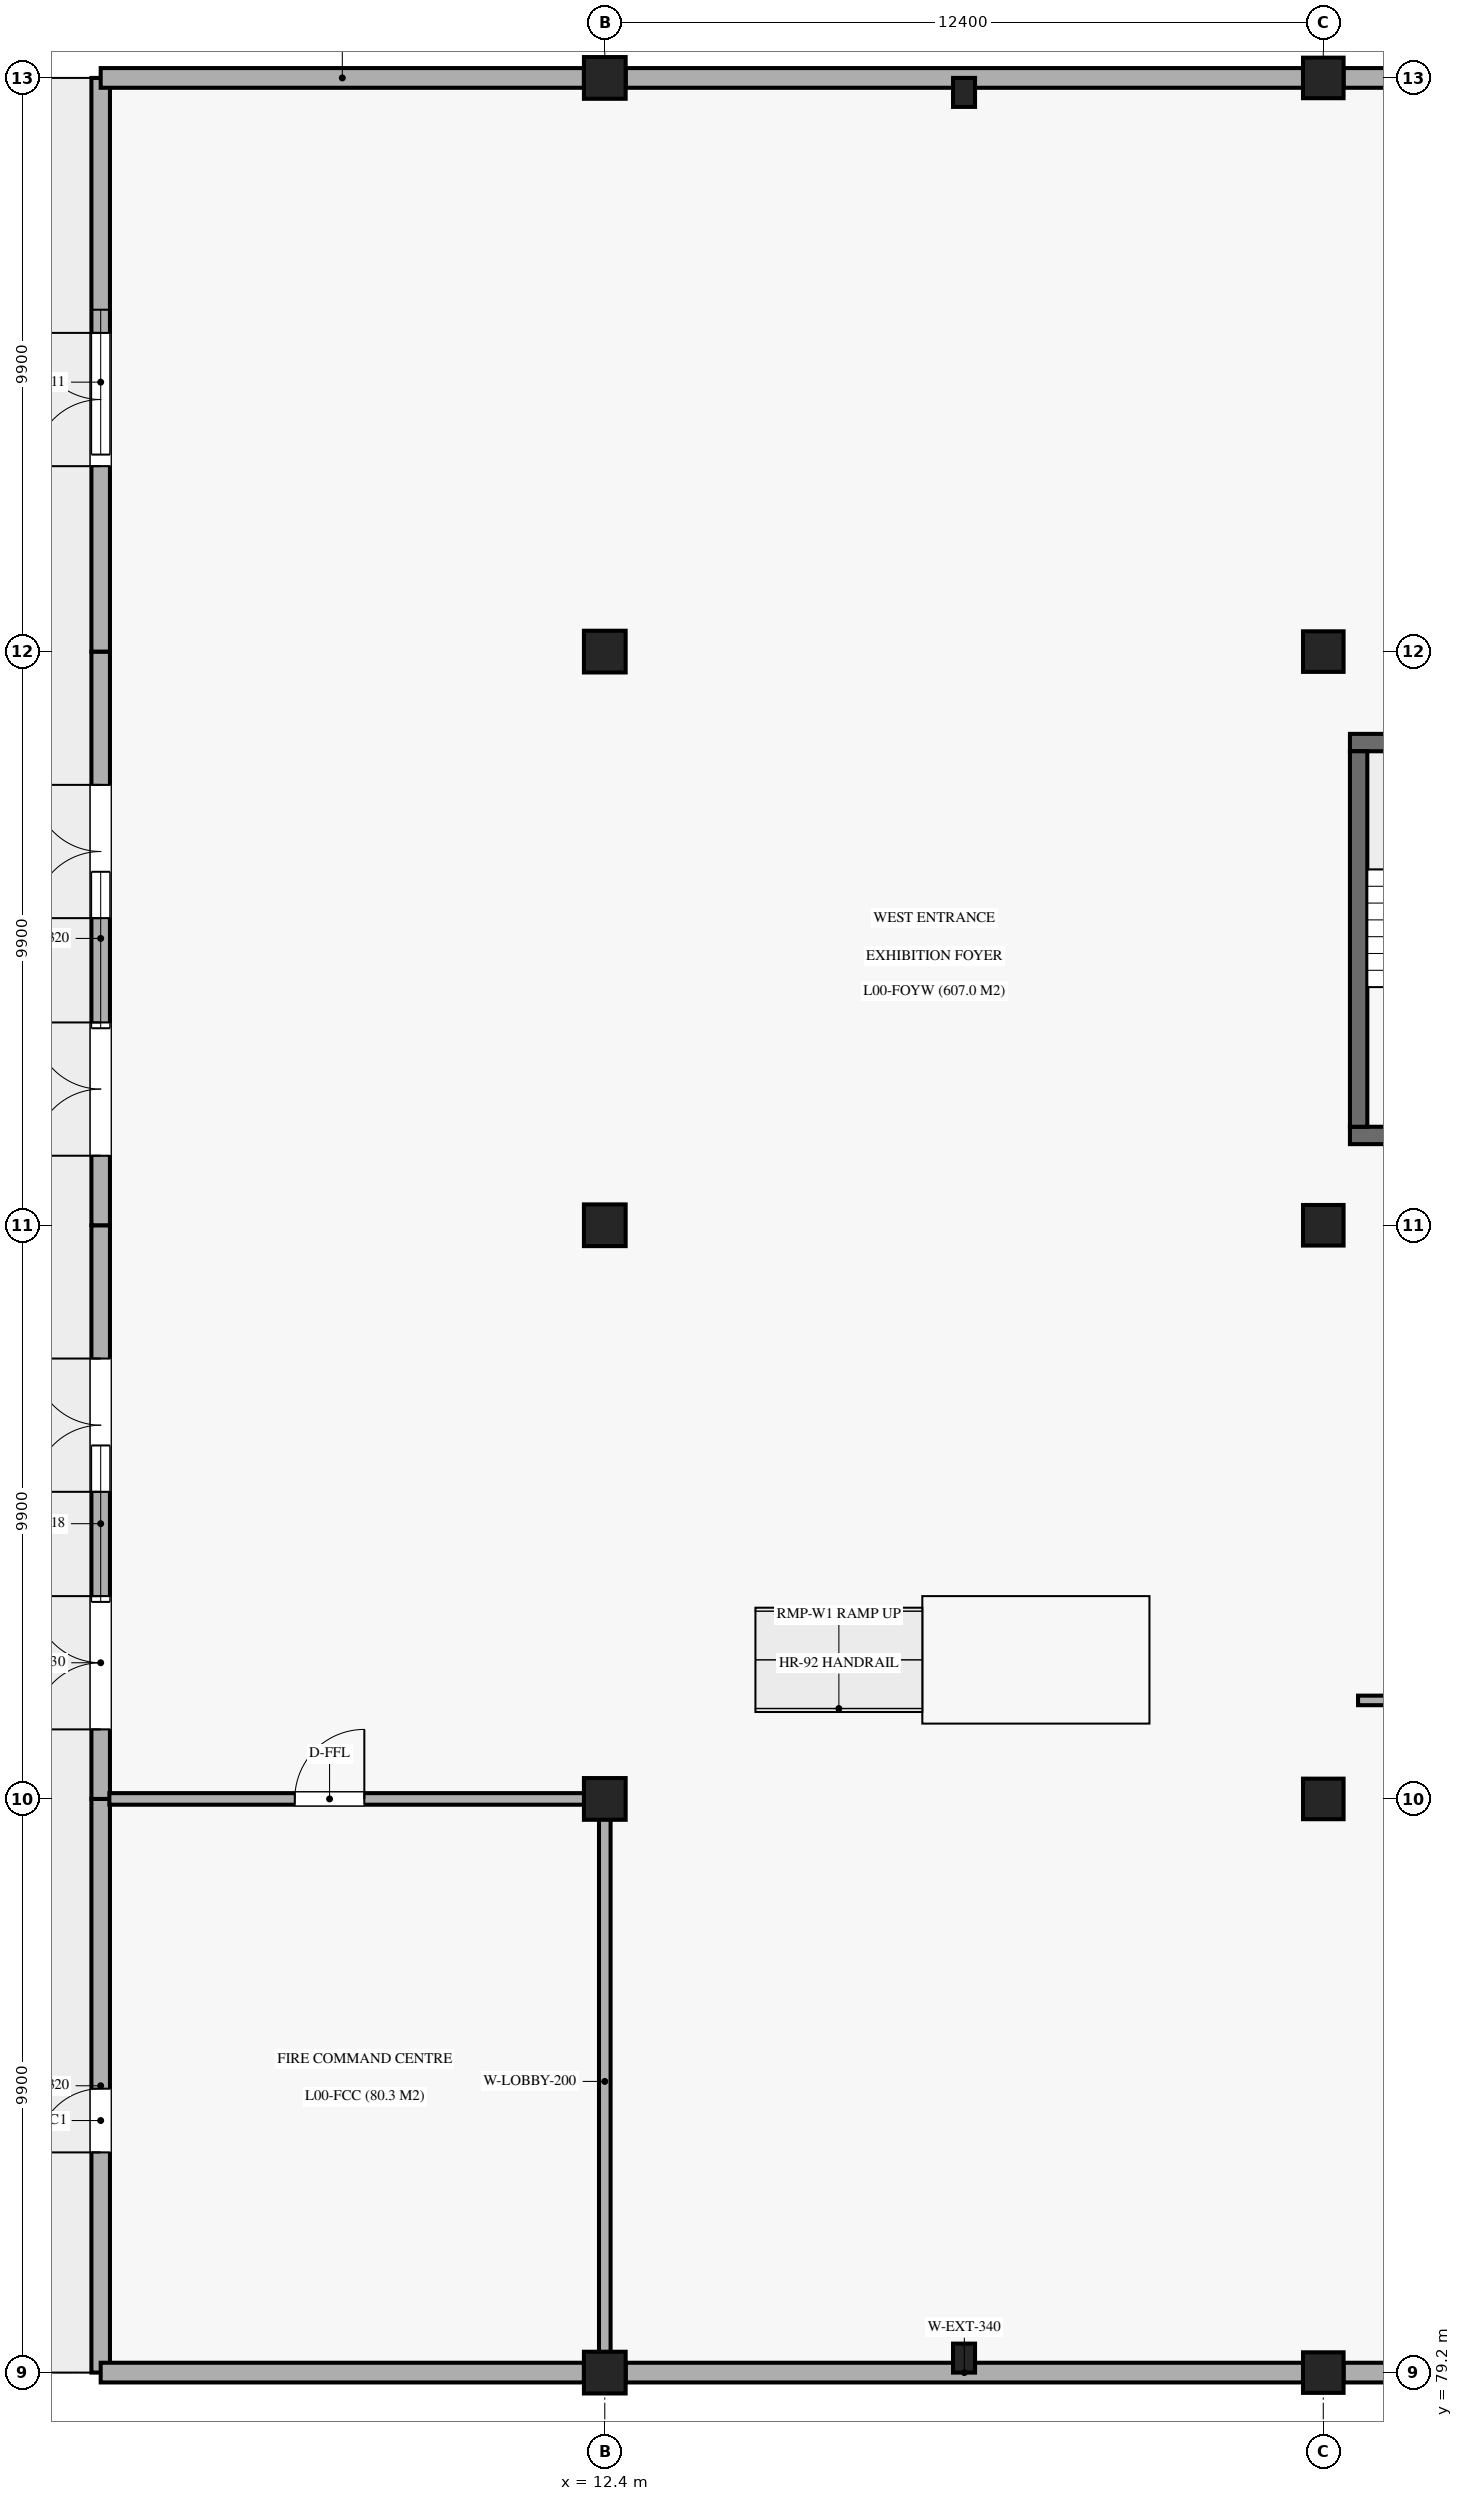
"""IFC4 building model, lengths in metres.
Left out: names, types, materials, properties, quantities, classifications, styles, units other than length and angle.
Written with IfcOpenShell. Run it as: python <this file> out.ifc"""

import sys

from ifc_helpers import new_model, si_unit, direction, frame, frame_2d, origin, origin_2d, place, context, subcontext, project, spatial, rectangle, circle, extrude, element, fill, save


model = new_model("IFC4")
c1 = context("Model", 3, precision=1e-05, world=origin(), true_north=direction((0.0, 1.0)))
c2 = subcontext(c1, "Body", "Model", "MODEL_VIEW")
j1 = project(units=[si_unit("LENGTHUNIT", "METRE"), si_unit("PLANEANGLEUNIT", "RADIAN")], contexts=[c1])
p1 = place(None, origin())
s1 = spatial("IfcSite", under=j1, at=p1, CompositionType="ELEMENT")
p2 = place(p1, origin())
s2 = spatial("IfcBuilding", under=s1, at=p2, CompositionType="ELEMENT")
p3 = place(p2, origin())
s3 = spatial("IfcBuildingStorey", under=s2, at=p3, CompositionType="ELEMENT", Elevation=0.0)
for number, where, z_axis, x_axis in (
    (1, (12.4, 79.2, 0.0), (0.0, 0.0, 1.0), (1.0, 0.0, 0.0)),
    (2, (12.4, 89.1, 0.0), (0.0, 0.0, 1.0), (1.0, 0.0, 0.0)),
    (3, (12.4, 99.0, 0.0), (0.0, 0.0, 1.0), (1.0, 0.0, 0.0)),
    (4, (12.4, 108.9, 0.0), (0.0, 0.0, 1.0), (1.0, 0.0, 0.0)),
    (5, (12.4, 118.8, 0.0), (0.0, 0.0, 1.0), (1.0, 0.0, 0.0)),
):
    element("IfcColumn", number, at=place(p3, frame(where, z_axis=z_axis, x_axis=x_axis)), inside=s3, PredefinedType="COLUMN", context=c2, shape_type="SweptSolid", body=[
        extrude(circle(Radius=0.36, at=origin_2d()), origin(), (0.0, 0.0, 1.0), 5.44),
    ])
for number, where, z_axis, x_axis in (
    (6, (24.8, 79.2, 0.0), (0.0, 0.0, 1.0), (1.0, 0.0, 0.0)),
    (7, (24.8, 89.1, 0.0), (0.0, 0.0, 1.0), (1.0, 0.0, 0.0)),
    (8, (24.8, 99.0, 0.0), (0.0, 0.0, 1.0), (1.0, 0.0, 0.0)),
    (9, (24.8, 108.9, 0.0), (0.0, 0.0, 1.0), (1.0, 0.0, 0.0)),
    (10, (24.8, 118.8, 0.0), (0.0, 0.0, 1.0), (1.0, 0.0, 0.0)),
):
    element("IfcColumn", number, at=place(p3, frame(where, z_axis=z_axis, x_axis=x_axis)), inside=s3, PredefinedType="COLUMN", context=c2, shape_type="SweptSolid", body=[
        extrude(rectangle(XDim=0.7, YDim=0.7, at=origin_2d()), origin(), (0.0, 0.0, 1.0), 5.44),
    ])
for number, where, z_axis, x_axis in (
    (11, (18.6, 79.45, 0.0), (0.0, 0.0, 1.0), (1.0, 0.0, 0.0)),
    (12, (18.6, 118.55, 0.0), (0.0, 0.0, 1.0), (1.0, 0.0, 0.0)),
):
    element("IfcColumn", number, at=place(p3, frame(where, z_axis=z_axis, x_axis=x_axis)), inside=s3, PredefinedType="PILASTER", context=c2, shape_type="SweptSolid", body=[
        extrude(rectangle(XDim=0.38, YDim=0.5, at=origin_2d()), origin(), (0.0, 0.0, 1.0), 5.44),
    ])
p4 = place(p3, frame((3.7, 79.2, 0.0), z_axis=(0.0, 0.0, 1.0), x_axis=(0.0, 1.0, 0.0)))
e13 = element("IfcWall", 13, at=p4, inside=s3, PredefinedType="SOLIDWALL", context=c2, shape_type="SweptSolid", body=[
    extrude(rectangle(XDim=9.9, YDim=0.32, at=frame_2d((4.95, 0.0))), origin(), (0.0, 0.0, 1.0), 4.4),
])
p5 = place(p4, frame((3.8, 0.0, 0.0)))
e14 = element("IfcOpeningElement", 14, at=p5, cuts=e13, PredefinedType="OPENING", context=c2, shape_type="SweptSolid", body=[
    extrude(rectangle(XDim=1.1, YDim=2.2, at=frame_2d((0.55, 1.1))), frame((0.0, 0.17, 0.0), z_axis=(0.0, -1.0, 0.0), x_axis=(1.0, 0.0, 0.0)), (0.0, 0.0, 1.0), 0.34),
])
p6 = place(p3, frame((3.7, 89.1, 0.0), z_axis=(0.0, 0.0, 1.0), x_axis=(0.0, 1.0, 0.0)))
e15 = element("IfcWall", 15, at=p6, inside=s3, PredefinedType="SOLIDWALL", context=c2, shape_type="SweptSolid", body=[
    extrude(rectangle(XDim=9.9, YDim=0.32, at=frame_2d((4.95, 0.0))), origin(), (0.0, 0.0, 1.0), 4.4),
])
p7 = place(p6, frame((3.4, 0.0, 2.65)))
e16 = element("IfcOpeningElement", 16, at=p7, cuts=e15, PredefinedType="OPENING", context=c2, shape_type="SweptSolid", body=[
    extrude(rectangle(XDim=2.7, YDim=1.5, at=frame_2d((1.35, 0.75))), frame((0.0, 0.17, 0.0), z_axis=(0.0, -1.0, 0.0), x_axis=(1.0, 0.0, 0.0)), (0.0, 0.0, 1.0), 0.34),
])
p8 = place(p6, frame((1.2, 0.0, 0.0)))
e17 = element("IfcOpeningElement", 17, at=p8, cuts=e15, PredefinedType="OPENING", context=c2, shape_type="SweptSolid", body=[
    extrude(rectangle(XDim=2.3, YDim=2.4, at=frame_2d((1.15, 1.2))), frame((0.0, 0.17, 0.0), z_axis=(0.0, -1.0, 0.0), x_axis=(1.0, 0.0, 0.0)), (0.0, 0.0, 1.0), 0.34),
])
p9 = place(p6, frame((5.3, 0.0, 0.0)))
e18 = element("IfcOpeningElement", 18, at=p9, cuts=e15, PredefinedType="OPENING", context=c2, shape_type="SweptSolid", body=[
    extrude(rectangle(XDim=2.3, YDim=2.4, at=frame_2d((1.15, 1.2))), frame((0.0, 0.17, 0.0), z_axis=(0.0, -1.0, 0.0), x_axis=(1.0, 0.0, 0.0)), (0.0, 0.0, 1.0), 0.34),
])
p10 = place(p3, frame((3.7, 99.0, 0.0), z_axis=(0.0, 0.0, 1.0), x_axis=(0.0, 1.0, 0.0)))
e19 = element("IfcWall", 19, at=p10, inside=s3, PredefinedType="SOLIDWALL", context=c2, shape_type="SweptSolid", body=[
    extrude(rectangle(XDim=9.9, YDim=0.32, at=frame_2d((4.95, 0.0))), origin(), (0.0, 0.0, 1.0), 4.4),
])
p11 = place(p10, frame((3.4, 0.0, 2.65)))
e20 = element("IfcOpeningElement", 20, at=p11, cuts=e19, PredefinedType="OPENING", context=c2, shape_type="SweptSolid", body=[
    extrude(rectangle(XDim=2.7, YDim=1.5, at=frame_2d((1.35, 0.75))), frame((0.0, 0.17, 0.0), z_axis=(0.0, -1.0, 0.0), x_axis=(1.0, 0.0, 0.0)), (0.0, 0.0, 1.0), 0.34),
])
p12 = place(p10, frame((1.2, 0.0, 0.0)))
e21 = element("IfcOpeningElement", 21, at=p12, cuts=e19, PredefinedType="OPENING", context=c2, shape_type="SweptSolid", body=[
    extrude(rectangle(XDim=2.3, YDim=2.4, at=frame_2d((1.15, 1.2))), frame((0.0, 0.17, 0.0), z_axis=(0.0, -1.0, 0.0), x_axis=(1.0, 0.0, 0.0)), (0.0, 0.0, 1.0), 0.34),
])
p13 = place(p10, frame((5.3, 0.0, 0.0)))
e22 = element("IfcOpeningElement", 22, at=p13, cuts=e19, PredefinedType="OPENING", context=c2, shape_type="SweptSolid", body=[
    extrude(rectangle(XDim=2.3, YDim=2.4, at=frame_2d((1.15, 1.2))), frame((0.0, 0.17, 0.0), z_axis=(0.0, -1.0, 0.0), x_axis=(1.0, 0.0, 0.0)), (0.0, 0.0, 1.0), 0.34),
])
p14 = place(p3, frame((3.7, 108.9, 0.0), z_axis=(0.0, 0.0, 1.0), x_axis=(0.0, 1.0, 0.0)))
e23 = element("IfcWall", 23, at=p14, inside=s3, PredefinedType="SOLIDWALL", context=c2, shape_type="SweptSolid", body=[
    extrude(rectangle(XDim=9.9, YDim=0.32, at=frame_2d((4.95, 0.0))), origin(), (0.0, 0.0, 1.0), 4.4),
])
p15 = place(p14, frame((3.4, 0.0, 2.65)))
e24 = element("IfcOpeningElement", 24, at=p15, cuts=e23, PredefinedType="OPENING", context=c2, shape_type="SweptSolid", body=[
    extrude(rectangle(XDim=2.5, YDim=1.6, at=frame_2d((1.25, 0.8))), frame((0.0, 0.17, 0.0), z_axis=(0.0, -1.0, 0.0), x_axis=(1.0, 0.0, 0.0)), (0.0, 0.0, 1.0), 0.34),
])
p16 = place(p14, frame((3.2, 0.0, 0.0)))
e25 = element("IfcOpeningElement", 25, at=p16, cuts=e23, PredefinedType="OPENING", context=c2, shape_type="SweptSolid", body=[
    extrude(rectangle(XDim=2.3, YDim=2.4, at=frame_2d((1.15, 1.2))), frame((0.0, 0.17, 0.0), z_axis=(0.0, -1.0, 0.0), x_axis=(1.0, 0.0, 0.0)), (0.0, 0.0, 1.0), 0.34),
])
p17 = place(p3, frame((3.7, 118.8, 0.0), z_axis=(0.0, 0.0, 1.0), x_axis=(1.0, 0.0, 0.0)))
e26 = element("IfcWall", 26, at=p17, inside=s3, PredefinedType="SOLIDWALL", context=c2, shape_type="SweptSolid", body=[
    extrude(rectangle(XDim=8.34, YDim=0.34, at=frame_2d((4.17, 0.0))), origin(), (0.0, 0.0, 1.0), 4.4),
])
p18 = place(p3, frame((3.7, 79.2, 0.0), z_axis=(0.0, 0.0, 1.0), x_axis=(1.0, 0.0, 0.0)))
e27 = element("IfcWall", 27, at=p18, inside=s3, PredefinedType="SOLIDWALL", context=c2, shape_type="SweptSolid", body=[
    extrude(rectangle(XDim=8.34, YDim=0.34, at=frame_2d((4.17, 0.0))), origin(), (0.0, 0.0, 1.0), 4.33),
])
p19 = place(p3, frame((12.76, 118.8, 0.0), z_axis=(0.0, 0.0, 1.0), x_axis=(1.0, 0.0, 0.0)))
e28 = element("IfcWall", 28, at=p19, inside=s3, PredefinedType="SOLIDWALL", context=c2, shape_type="SweptSolid", body=[
    extrude(rectangle(XDim=11.69, YDim=0.34, at=frame_2d((5.845, 0.0))), origin(), (0.0, 0.0, 1.0), 4.4),
])
p20 = place(p3, frame((12.76, 79.2, 0.0), z_axis=(0.0, 0.0, 1.0), x_axis=(1.0, 0.0, 0.0)))
e29 = element("IfcWall", 29, at=p20, inside=s3, PredefinedType="SOLIDWALL", context=c2, shape_type="SweptSolid", body=[
    extrude(rectangle(XDim=11.69, YDim=0.34, at=frame_2d((5.845, 0.0))), origin(), (0.0, 0.0, 1.0), 4.33),
])
p21 = place(p3, frame((25.15, 118.8, 0.0), z_axis=(0.0, 0.0, 1.0), x_axis=(1.0, 0.0, 0.0)))
e30 = element("IfcWall", 30, at=p21, inside=s3, PredefinedType="SOLIDWALL", context=c2, shape_type="SweptSolid", body=[
    extrude(rectangle(XDim=11.7, YDim=0.34, at=frame_2d((5.85, 0.0))), origin(), (0.0, 0.0, 1.0), 4.4),
])
p22 = place(p3, frame((25.15, 79.2, 0.0), z_axis=(0.0, 0.0, 1.0), x_axis=(1.0, 0.0, 0.0)))
e31 = element("IfcWall", 31, at=p22, inside=s3, PredefinedType="SOLIDWALL", context=c2, shape_type="SweptSolid", body=[
    extrude(rectangle(XDim=11.7, YDim=0.34, at=frame_2d((5.85, 0.0))), origin(), (0.0, 0.0, 1.0), 4.33),
])
p23 = place(p3, frame((25.26, 100.55, 0.0), z_axis=(0.0, 0.0, 1.0), x_axis=(1.0, 0.0, 0.0)))
e32 = element("IfcWall", 32, at=p23, inside=s3, PredefinedType="SHEAR", context=c2, shape_type="SweptSolid", body=[
    extrude(rectangle(XDim=7.08, YDim=0.3, at=frame_2d((3.54, 0.0))), origin(), (0.0, 0.0, 1.0), 5.18),
])
p24 = place(p23, frame((0.72, 0.0, 0.0)))
e33 = element("IfcOpeningElement", 33, at=p24, cuts=e32, PredefinedType="OPENING", context=c2, shape_type="SweptSolid", body=[
    extrude(rectangle(XDim=1.2, YDim=2.2, at=frame_2d((0.6, 1.1))), frame((0.0, 0.16, 0.0), z_axis=(0.0, -1.0, 0.0), x_axis=(1.0, 0.0, 0.0)), (0.0, 0.0, 1.0), 0.32),
])
p25 = place(p3, frame((25.26, 107.33, 0.0), z_axis=(0.0, 0.0, 1.0), x_axis=(1.0, 0.0, 0.0)))
e34 = element("IfcWall", 34, at=p25, inside=s3, PredefinedType="SHEAR", context=c2, shape_type="SweptSolid", body=[
    extrude(rectangle(XDim=7.08, YDim=0.3, at=frame_2d((3.54, 0.0))), origin(), (0.0, 0.0, 1.0), 5.18),
])
p26 = place(p3, frame((25.41, 100.7, 0.0), z_axis=(0.0, 0.0, 1.0), x_axis=(0.0, 1.0, 0.0)))
e35 = element("IfcWall", 35, at=p26, inside=s3, PredefinedType="SHEAR", context=c2, shape_type="SweptSolid", body=[
    extrude(rectangle(XDim=6.48, YDim=0.3, at=frame_2d((3.24, 0.0))), origin(), (0.0, 0.0, 1.0), 5.18),
])
p27 = place(p3, frame((12.4, 79.35, 0.0), z_axis=(0.0, 0.0, 1.0), x_axis=(0.0, 1.0, 0.0)))
e36 = element("IfcWall", 36, at=p27, inside=s3, PredefinedType="SOLIDWALL", context=c2, shape_type="SweptSolid", body=[
    extrude(rectangle(XDim=9.75, YDim=0.2, at=frame_2d((4.875, 0.0))), origin(), (0.0, 0.0, 1.0), 4.3),
])
p28 = place(p3, frame((3.85, 89.1, 0.0), z_axis=(0.0, 0.0, 1.0), x_axis=(1.0, 0.0, 0.0)))
e37 = element("IfcWall", 37, at=p28, inside=s3, PredefinedType="SOLIDWALL", context=c2, shape_type="SweptSolid", body=[
    extrude(rectangle(XDim=8.55, YDim=0.2, at=frame_2d((4.275, 0.0))), origin(), (0.0, 0.0, 1.0), 4.3),
])
p29 = place(p28, frame((3.2, 0.0, 0.0)))
e38 = element("IfcOpeningElement", 38, at=p29, cuts=e37, PredefinedType="OPENING", context=c2, shape_type="SweptSolid", body=[
    extrude(rectangle(XDim=1.2, YDim=2.25, at=frame_2d((0.6, 1.125))), frame((0.0, 0.11, 0.0), z_axis=(0.0, -1.0, 0.0), x_axis=(1.0, 0.0, 0.0)), (0.0, 0.0, 1.0), 0.22),
])
p30 = place(p3, frame((25.4, 90.8, 0.0), z_axis=(0.0, 0.0, 1.0), x_axis=(1.0, 0.0, 0.0)))
e39 = element("IfcWall", 39, at=p30, inside=s3, PredefinedType="PARTITIONING", context=c2, shape_type="SweptSolid", body=[
    extrude(rectangle(XDim=36.0, YDim=0.165, at=frame_2d((18.0, 0.0))), origin(), (0.0, 0.0, 1.0), 4.3),
])
p31 = place(p30, frame((16.0, 0.0, 0.0)))
e40 = element("IfcOpeningElement", 40, at=p31, cuts=e39, PredefinedType="OPENING", context=c2, shape_type="SweptSolid", body=[
    extrude(rectangle(XDim=1.6, YDim=2.25, at=frame_2d((0.8, 1.125))), frame((0.0, 0.093, 0.0), z_axis=(0.0, -1.0, 0.0), x_axis=(1.0, 0.0, 0.0)), (0.0, 0.0, 1.0), 0.185),
])
p32 = place(p5, origin())
e41 = element("IfcDoor", 41, at=p32, inside=s3, OperationType="SINGLE_SWING_LEFT", PredefinedType="DOOR", context=c2, shape_type="SweptSolid", body=[
    extrude(rectangle(XDim=1.1, YDim=2.2, at=frame_2d((0.55, 1.1))), frame((0.0, 0.025, 0.0), z_axis=(0.0, -1.0, 0.0), x_axis=(1.0, 0.0, 0.0)), (0.0, 0.0, 1.0), 0.05),
])
fill(e14, e41)
p33 = place(p7, origin())
e42 = element("IfcWindow", 42, at=p33, inside=s3, PartitioningType="SINGLE_PANEL", PredefinedType="WINDOW", context=c2, shape_type="SweptSolid", body=[
    extrude(rectangle(XDim=2.7, YDim=1.5, at=frame_2d((1.35, 0.75))), frame((0.0, 0.03, 0.0), z_axis=(0.0, -1.0, 0.0), x_axis=(1.0, 0.0, 0.0)), (0.0, 0.0, 1.0), 0.06),
])
fill(e16, e42)
p34 = place(p8, origin())
e43 = element("IfcDoor", 43, at=p34, inside=s3, OperationType="DOUBLE_DOOR_SINGLE_SWING", PredefinedType="DOOR", context=c2, shape_type="SweptSolid", body=[
    extrude(rectangle(XDim=2.3, YDim=2.4, at=frame_2d((1.15, 1.2))), frame((0.0, 0.025, 0.0), z_axis=(0.0, -1.0, 0.0), x_axis=(1.0, 0.0, 0.0)), (0.0, 0.0, 1.0), 0.05),
])
fill(e17, e43)
p35 = place(p9, origin())
e44 = element("IfcDoor", 44, at=p35, inside=s3, OperationType="DOUBLE_DOOR_SINGLE_SWING", PredefinedType="DOOR", context=c2, shape_type="SweptSolid", body=[
    extrude(rectangle(XDim=2.3, YDim=2.4, at=frame_2d((1.15, 1.2))), frame((0.0, 0.025, 0.0), z_axis=(0.0, -1.0, 0.0), x_axis=(1.0, 0.0, 0.0)), (0.0, 0.0, 1.0), 0.05),
])
fill(e18, e44)
p36 = place(p11, origin())
e45 = element("IfcWindow", 45, at=p36, inside=s3, PartitioningType="SINGLE_PANEL", PredefinedType="WINDOW", context=c2, shape_type="SweptSolid", body=[
    extrude(rectangle(XDim=2.7, YDim=1.5, at=frame_2d((1.35, 0.75))), frame((0.0, 0.03, 0.0), z_axis=(0.0, -1.0, 0.0), x_axis=(1.0, 0.0, 0.0)), (0.0, 0.0, 1.0), 0.06),
])
fill(e20, e45)
p37 = place(p12, origin())
e46 = element("IfcDoor", 46, at=p37, inside=s3, OperationType="DOUBLE_DOOR_SINGLE_SWING", PredefinedType="DOOR", context=c2, shape_type="SweptSolid", body=[
    extrude(rectangle(XDim=2.3, YDim=2.4, at=frame_2d((1.15, 1.2))), frame((0.0, 0.025, 0.0), z_axis=(0.0, -1.0, 0.0), x_axis=(1.0, 0.0, 0.0)), (0.0, 0.0, 1.0), 0.05),
])
fill(e21, e46)
p38 = place(p13, origin())
e47 = element("IfcDoor", 47, at=p38, inside=s3, OperationType="DOUBLE_DOOR_SINGLE_SWING", PredefinedType="DOOR", context=c2, shape_type="SweptSolid", body=[
    extrude(rectangle(XDim=2.3, YDim=2.4, at=frame_2d((1.15, 1.2))), frame((0.0, 0.025, 0.0), z_axis=(0.0, -1.0, 0.0), x_axis=(1.0, 0.0, 0.0)), (0.0, 0.0, 1.0), 0.05),
])
fill(e22, e47)
p39 = place(p15, origin())
e48 = element("IfcWindow", 48, at=p39, inside=s3, PartitioningType="SINGLE_PANEL", PredefinedType="WINDOW", context=c2, shape_type="SweptSolid", body=[
    extrude(rectangle(XDim=2.5, YDim=1.6, at=frame_2d((1.25, 0.8))), frame((0.0, 0.03, 0.0), z_axis=(0.0, -1.0, 0.0), x_axis=(1.0, 0.0, 0.0)), (0.0, 0.0, 1.0), 0.06),
])
fill(e24, e48)
p40 = place(p16, origin())
e49 = element("IfcDoor", 49, at=p40, inside=s3, OperationType="DOUBLE_DOOR_SINGLE_SWING", PredefinedType="DOOR", context=c2, shape_type="SweptSolid", body=[
    extrude(rectangle(XDim=2.3, YDim=2.4, at=frame_2d((1.15, 1.2))), frame((0.0, 0.025, 0.0), z_axis=(0.0, -1.0, 0.0), x_axis=(1.0, 0.0, 0.0)), (0.0, 0.0, 1.0), 0.05),
])
fill(e25, e49)
p41 = place(p29, origin())
e50 = element("IfcDoor", 50, at=p41, inside=s3, OperationType="SINGLE_SWING_RIGHT", PredefinedType="DOOR", context=c2, shape_type="SweptSolid", body=[
    extrude(rectangle(XDim=1.2, YDim=2.25, at=frame_2d((0.6, 1.125))), frame((0.0, 0.025, 0.0), z_axis=(0.0, -1.0, 0.0), x_axis=(1.0, 0.0, 0.0)), (0.0, 0.0, 1.0), 0.05),
])
fill(e38, e50)
save(model, sys.argv[1])
